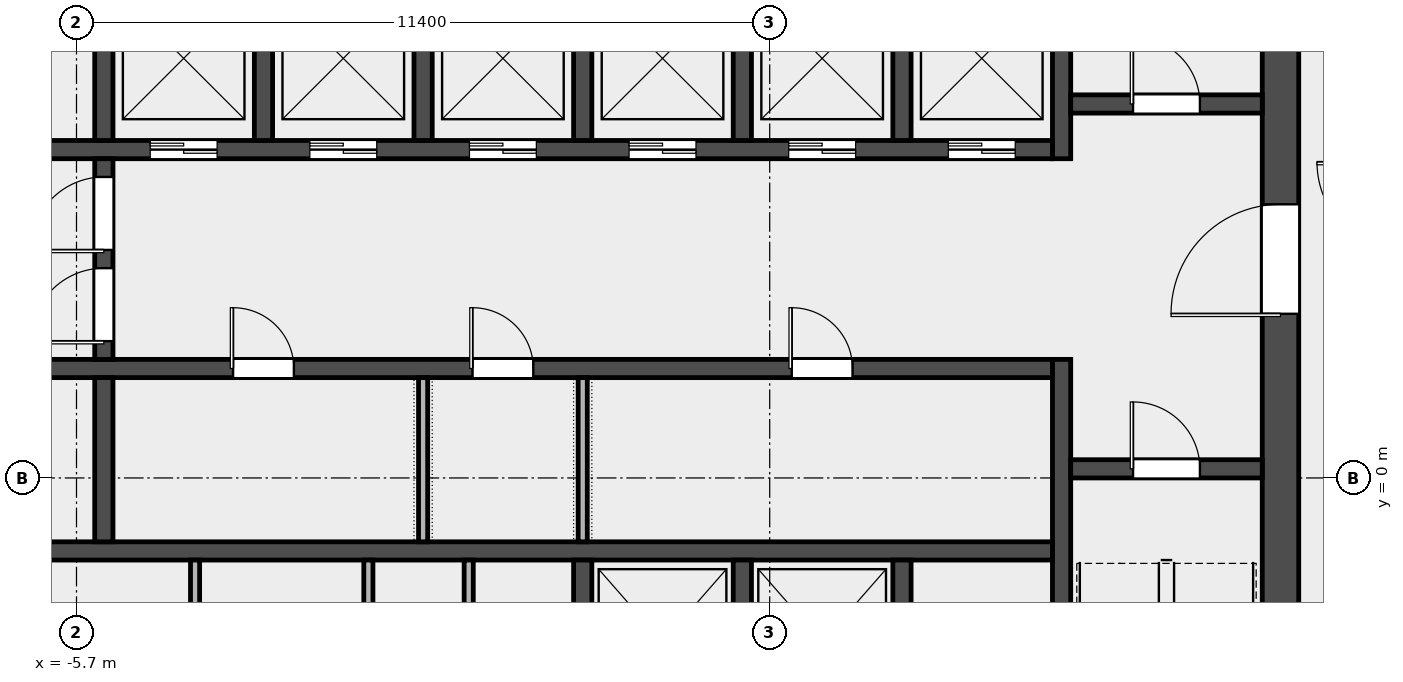
"""IFC4 building model, lengths in metres.
Left out: names, types, materials, properties, quantities, classifications, styles, units other than length and angle.
Written with IfcOpenShell. Run it as: python <this file> out.ifc"""

import sys

from ifc_helpers import new_model, si_unit, direction, frame, frame_2d, origin, place, context, subcontext, project, spatial, rectangle, extrude, element, fill, save


model = new_model("IFC4")
c1 = context("Model", 3, precision=1e-05, world=origin(), true_north=direction((0.0, 1.0)))
c2 = subcontext(c1, "Body", "Model", "MODEL_VIEW")
j1 = project(units=[si_unit("LENGTHUNIT", "METRE"), si_unit("PLANEANGLEUNIT", "RADIAN")], contexts=[c1])
p1 = place(None, origin())
s1 = spatial("IfcSite", under=j1, at=p1, CompositionType="ELEMENT")
p2 = place(p1, origin())
s2 = spatial("IfcBuilding", under=s1, at=p2, CompositionType="ELEMENT")
p3 = place(p2, frame((0.0, 0.0, 303.4)))
s3 = spatial("IfcBuildingStorey", under=s2, at=p3, CompositionType="ELEMENT", Elevation=303.4)
p4 = place(p3, frame((14.1, -6.6, 0.0), z_axis=(0.0, 0.0, 1.0), x_axis=(0.0, 1.0, 0.0)))
e1 = element("IfcWall", 1, at=p4, inside=s3, PredefinedType="SHEAR", context=c2, shape_type="SweptSolid", body=[
    extrude(rectangle(XDim=19.5, YDim=0.6, at=frame_2d((9.75, 0.0))), origin(), (0.0, 0.0, 1.0), 3.7),
])
p5 = place(p4, frame((9.3, 0.0, 0.0)))
e2 = element("IfcOpeningElement", 2, at=p5, cuts=e1, PredefinedType="OPENING", context=c2, shape_type="SweptSolid", body=[
    extrude(rectangle(XDim=1.8, YDim=2.1, at=frame_2d((0.9, 1.05))), frame((0.0, 0.312, 0.0), z_axis=(0.0, -1.0, 0.0), x_axis=(1.0, 0.0, 0.0)), (0.0, 0.0, 1.0), 0.624),
])
p6 = place(p3, frame((10.5, -6.6, 0.0), z_axis=(0.0, 0.0, 1.0), x_axis=(0.0, 1.0, 0.0)))
e3 = element("IfcWall", 3, at=p6, inside=s3, PredefinedType="SHEAR", context=c2, shape_type="SweptSolid", body=[
    extrude(rectangle(XDim=8.55, YDim=0.3, at=frame_2d((4.275, 0.0))), origin(), (0.0, 0.0, 1.0), 3.7),
])
p7 = place(p3, frame((10.5, 5.25, 0.0), z_axis=(0.0, 0.0, 1.0), x_axis=(0.0, 1.0, 0.0)))
e4 = element("IfcWall", 4, at=p7, inside=s3, PredefinedType="SHEAR", context=c2, shape_type="SweptSolid", body=[
    extrude(rectangle(XDim=7.65, YDim=0.3, at=frame_2d((3.825, 0.0))), origin(), (0.0, 0.0, 1.0), 3.7),
])
p8 = place(p3, frame((10.65, 0.15, 0.0), z_axis=(0.0, 0.0, 1.0), x_axis=(1.0, 0.0, 0.0)))
e5 = element("IfcWall", 5, at=p8, inside=s3, PredefinedType="SOLIDWALL", context=c2, shape_type="SweptSolid", body=[
    extrude(rectangle(XDim=3.15, YDim=0.3, at=frame_2d((1.575, 0.0))), origin(), (0.0, 0.0, 1.0), 3.7),
])
p9 = place(p8, frame((1.025, 0.0, 0.0)))
e6 = element("IfcOpeningElement", 6, at=p9, cuts=e5, PredefinedType="OPENING", context=c2, shape_type="SweptSolid", body=[
    extrude(rectangle(XDim=1.1, YDim=2.1, at=frame_2d((0.55, 1.05))), frame((0.0, 0.162, 0.0), z_axis=(0.0, -1.0, 0.0), x_axis=(1.0, 0.0, 0.0)), (0.0, 0.0, 1.0), 0.324),
])
p10 = place(p3, frame((10.65, 6.15, 0.0), z_axis=(0.0, 0.0, 1.0), x_axis=(1.0, 0.0, 0.0)))
e7 = element("IfcWall", 7, at=p10, inside=s3, PredefinedType="SOLIDWALL", context=c2, shape_type="SweptSolid", body=[
    extrude(rectangle(XDim=3.15, YDim=0.3, at=frame_2d((1.575, 0.0))), origin(), (0.0, 0.0, 1.0), 3.7),
])
p11 = place(p10, frame((1.025, 0.0, 0.0)))
e8 = element("IfcOpeningElement", 8, at=p11, cuts=e7, PredefinedType="OPENING", context=c2, shape_type="SweptSolid", body=[
    extrude(rectangle(XDim=1.1, YDim=2.1, at=frame_2d((0.55, 1.05))), frame((0.0, 0.162, 0.0), z_axis=(0.0, -1.0, 0.0), x_axis=(1.0, 0.0, 0.0)), (0.0, 0.0, 1.0), 0.324),
])
p12 = place(p3, frame((-10.35, -1.2, 0.0), z_axis=(0.0, 0.0, 1.0), x_axis=(1.0, 0.0, 0.0)))
e9 = element("IfcWall", 9, at=p12, inside=s3, PredefinedType="SOLIDWALL", context=c2, shape_type="SweptSolid", body=[
    extrude(rectangle(XDim=20.7, YDim=0.3, at=frame_2d((10.35, 0.0))), origin(), (0.0, 0.0, 1.0), 3.7),
])
p13 = place(p3, frame((-10.35, 1.8, 0.0), z_axis=(0.0, 0.0, 1.0), x_axis=(1.0, 0.0, 0.0)))
e10 = element("IfcWall", 10, at=p13, inside=s3, PredefinedType="SOLIDWALL", context=c2, shape_type="SweptSolid", body=[
    extrude(rectangle(XDim=20.7, YDim=0.3, at=frame_2d((10.35, 0.0))), origin(), (0.0, 0.0, 1.0), 3.7),
])
p14 = place(p13, frame((0.512, 0.0, 0.0)))
e11 = element("IfcOpeningElement", 11, at=p14, cuts=e10, PredefinedType="OPENING", context=c2, shape_type="SweptSolid", body=[
    extrude(rectangle(XDim=1.3, YDim=2.1, at=frame_2d((0.65, 1.05))), frame((0.0, 0.162, 0.0), z_axis=(0.0, -1.0, 0.0), x_axis=(1.0, 0.0, 0.0)), (0.0, 0.0, 1.0), 0.324),
])
p15 = place(p13, frame((7.225, 0.0, 0.0)))
e12 = element("IfcOpeningElement", 12, at=p15, cuts=e10, PredefinedType="OPENING", context=c2, shape_type="SweptSolid", body=[
    extrude(rectangle(XDim=1.0, YDim=2.1, at=frame_2d((0.5, 1.05))), frame((0.0, 0.162, 0.0), z_axis=(0.0, -1.0, 0.0), x_axis=(1.0, 0.0, 0.0)), (0.0, 0.0, 1.0), 0.324),
])
p16 = place(p13, frame((11.163, 0.0, 0.0)))
e13 = element("IfcOpeningElement", 13, at=p16, cuts=e10, PredefinedType="OPENING", context=c2, shape_type="SweptSolid", body=[
    extrude(rectangle(XDim=1.0, YDim=2.1, at=frame_2d((0.5, 1.05))), frame((0.0, 0.162, 0.0), z_axis=(0.0, -1.0, 0.0), x_axis=(1.0, 0.0, 0.0)), (0.0, 0.0, 1.0), 0.324),
])
p17 = place(p13, frame((16.413, 0.0, 0.0)))
e14 = element("IfcOpeningElement", 14, at=p17, cuts=e10, PredefinedType="OPENING", context=c2, shape_type="SweptSolid", body=[
    extrude(rectangle(XDim=1.0, YDim=2.1, at=frame_2d((0.5, 1.05))), frame((0.0, 0.162, 0.0), z_axis=(0.0, -1.0, 0.0), x_axis=(1.0, 0.0, 0.0)), (0.0, 0.0, 1.0), 0.324),
])
p18 = place(p3, frame((-10.35, 5.4, 0.0), z_axis=(0.0, 0.0, 1.0), x_axis=(1.0, 0.0, 0.0)))
e15 = element("IfcWall", 15, at=p18, inside=s3, PredefinedType="SOLIDWALL", context=c2, shape_type="SweptSolid", body=[
    extrude(rectangle(XDim=20.7, YDim=0.3, at=frame_2d((10.35, 0.0))), origin(), (0.0, 0.0, 1.0), 3.7),
])
p19 = place(p18, frame((0.512, 0.0, 0.0)))
e16 = element("IfcOpeningElement", 16, at=p19, cuts=e15, PredefinedType="OPENING", context=c2, shape_type="SweptSolid", body=[
    extrude(rectangle(XDim=1.3, YDim=2.1, at=frame_2d((0.65, 1.05))), frame((0.0, 0.162, 0.0), z_axis=(0.0, -1.0, 0.0), x_axis=(1.0, 0.0, 0.0)), (0.0, 0.0, 1.0), 0.324),
])
p20 = place(p18, frame((5.863, 0.0, 0.0)))
e17 = element("IfcOpeningElement", 17, at=p20, cuts=e15, PredefinedType="OPENING", context=c2, shape_type="SweptSolid", body=[
    extrude(rectangle(XDim=1.1, YDim=2.1, at=frame_2d((0.55, 1.05))), frame((0.0, 0.162, 0.0), z_axis=(0.0, -1.0, 0.0), x_axis=(1.0, 0.0, 0.0)), (0.0, 0.0, 1.0), 0.324),
])
p21 = place(p18, frame((8.488, 0.0, 0.0)))
e18 = element("IfcOpeningElement", 18, at=p21, cuts=e15, PredefinedType="OPENING", context=c2, shape_type="SweptSolid", body=[
    extrude(rectangle(XDim=1.1, YDim=2.1, at=frame_2d((0.55, 1.05))), frame((0.0, 0.162, 0.0), z_axis=(0.0, -1.0, 0.0), x_axis=(1.0, 0.0, 0.0)), (0.0, 0.0, 1.0), 0.324),
])
p22 = place(p18, frame((11.113, 0.0, 0.0)))
e19 = element("IfcOpeningElement", 19, at=p22, cuts=e15, PredefinedType="OPENING", context=c2, shape_type="SweptSolid", body=[
    extrude(rectangle(XDim=1.1, YDim=2.1, at=frame_2d((0.55, 1.05))), frame((0.0, 0.162, 0.0), z_axis=(0.0, -1.0, 0.0), x_axis=(1.0, 0.0, 0.0)), (0.0, 0.0, 1.0), 0.324),
])
p23 = place(p18, frame((13.738, 0.0, 0.0)))
e20 = element("IfcOpeningElement", 20, at=p23, cuts=e15, PredefinedType="OPENING", context=c2, shape_type="SweptSolid", body=[
    extrude(rectangle(XDim=1.1, YDim=2.1, at=frame_2d((0.55, 1.05))), frame((0.0, 0.162, 0.0), z_axis=(0.0, -1.0, 0.0), x_axis=(1.0, 0.0, 0.0)), (0.0, 0.0, 1.0), 0.324),
])
p24 = place(p18, frame((16.363, 0.0, 0.0)))
e21 = element("IfcOpeningElement", 21, at=p24, cuts=e15, PredefinedType="OPENING", context=c2, shape_type="SweptSolid", body=[
    extrude(rectangle(XDim=1.1, YDim=2.1, at=frame_2d((0.55, 1.05))), frame((0.0, 0.162, 0.0), z_axis=(0.0, -1.0, 0.0), x_axis=(1.0, 0.0, 0.0)), (0.0, 0.0, 1.0), 0.324),
])
p25 = place(p18, frame((18.988, 0.0, 0.0)))
e22 = element("IfcOpeningElement", 22, at=p25, cuts=e15, PredefinedType="OPENING", context=c2, shape_type="SweptSolid", body=[
    extrude(rectangle(XDim=1.1, YDim=2.1, at=frame_2d((0.55, 1.05))), frame((0.0, 0.162, 0.0), z_axis=(0.0, -1.0, 0.0), x_axis=(1.0, 0.0, 0.0)), (0.0, 0.0, 1.0), 0.324),
])
for number, where, z_axis, x_axis in (
    (23, (-5.25, -1.05, 0.0), (0.0, 0.0, 1.0), (0.0, 1.0, 0.0)),
    (24, (-5.25, 5.55, 0.0), (0.0, 0.0, 1.0), (0.0, 1.0, 0.0)),
    (25, (-2.625, 5.55, 0.0), (0.0, 0.0, 1.0), (0.0, 1.0, 0.0)),
    (26, (0.0, 5.55, 0.0), (0.0, 0.0, 1.0), (0.0, 1.0, 0.0)),
    (27, (2.625, 5.55, 0.0), (0.0, 0.0, 1.0), (0.0, 1.0, 0.0)),
    (28, (5.25, 5.55, 0.0), (0.0, 0.0, 1.0), (0.0, 1.0, 0.0)),
    (29, (7.875, 5.55, 0.0), (0.0, 0.0, 1.0), (0.0, 1.0, 0.0)),
):
    element("IfcWall", number, at=place(p3, frame(where, z_axis=z_axis, x_axis=x_axis)), inside=s3, PredefinedType="SOLIDWALL", context=c2, shape_type="SweptSolid", body=[
        extrude(rectangle(XDim=2.7, YDim=0.3, at=frame_2d((1.35, 0.0))), origin(), (0.0, 0.0, 1.0), 3.7),
    ])
p26 = place(p3, frame((-5.25, 1.95, 0.0), z_axis=(0.0, 0.0, 1.0), x_axis=(0.0, 1.0, 0.0)))
e30 = element("IfcWall", 30, at=p26, inside=s3, PredefinedType="SOLIDWALL", context=c2, shape_type="SweptSolid", body=[
    extrude(rectangle(XDim=3.3, YDim=0.3, at=frame_2d((1.65, 0.0))), origin(), (0.0, 0.0, 1.0), 3.7),
])
p27 = place(p26, frame((0.3, 0.0, 0.0)))
e31 = element("IfcOpeningElement", 31, at=p27, cuts=e30, PredefinedType="OPENING", context=c2, shape_type="SweptSolid", body=[
    extrude(rectangle(XDim=1.2, YDim=2.1, at=frame_2d((0.6, 1.05))), frame((0.0, 0.162, 0.0), z_axis=(0.0, -1.0, 0.0), x_axis=(1.0, 0.0, 0.0)), (0.0, 0.0, 1.0), 0.324),
])
p28 = place(p26, frame((1.8, 0.0, 0.0)))
e32 = element("IfcOpeningElement", 32, at=p28, cuts=e30, PredefinedType="OPENING", context=c2, shape_type="SweptSolid", body=[
    extrude(rectangle(XDim=1.2, YDim=2.1, at=frame_2d((0.6, 1.05))), frame((0.0, 0.162, 0.0), z_axis=(0.0, -1.0, 0.0), x_axis=(1.0, 0.0, 0.0)), (0.0, 0.0, 1.0), 0.324),
])
for number, where, z_axis, x_axis in (
    (33, (2.625, -4.05, 0.0), (0.0, 0.0, 1.0), (0.0, 1.0, 0.0)),
    (34, (5.25, -4.05, 0.0), (0.0, 0.0, 1.0), (0.0, 1.0, 0.0)),
    (35, (7.875, -4.05, 0.0), (0.0, 0.0, 1.0), (0.0, 1.0, 0.0)),
):
    element("IfcWall", number, at=place(p3, frame(where, z_axis=z_axis, x_axis=x_axis)), inside=s3, PredefinedType="SOLIDWALL", context=c2, shape_type="SweptSolid", body=[
        extrude(rectangle(XDim=2.7, YDim=0.3, at=frame_2d((1.35, 0.0))), origin(), (0.0, 0.0, 1.0), 3.7),
    ])
for number, where, z_axis, x_axis in (
    (36, (-3.75, -4.425, 0.0), (0.0, 0.0, 1.0), (0.0, 1.0, 0.0)),
    (37, (-0.9, -4.425, 0.0), (0.0, 0.0, 1.0), (0.0, 1.0, 0.0)),
):
    element("IfcWall", number, at=place(p3, frame(where, z_axis=z_axis, x_axis=x_axis)), inside=s3, PredefinedType="PARTITIONING", context=c2, shape_type="SweptSolid", body=[
        extrude(rectangle(XDim=3.075, YDim=0.15, at=frame_2d((1.538, 0.0))), origin(), (0.0, 0.0, 1.0), 3.7),
    ])
p29 = place(p3, frame((0.75, -6.6, 0.0), z_axis=(0.0, 0.0, 1.0), x_axis=(0.0, 1.0, 0.0)))
e38 = element("IfcWall", 38, at=p29, inside=s3, PredefinedType="PARTITIONING", context=c2, shape_type="SweptSolid", body=[
    extrude(rectangle(XDim=5.25, YDim=0.15, at=frame_2d((2.625, 0.0))), origin(), (0.0, 0.0, 1.0), 3.7),
])
for number, where, z_axis, x_axis in (
    (39, (0.0, -1.05, 0.0), (0.0, 0.0, 1.0), (0.0, 1.0, 0.0)),
    (40, (2.625, -1.05, 0.0), (0.0, 0.0, 1.0), (0.0, 1.0, 0.0)),
):
    element("IfcWall", number, at=place(p3, frame(where, z_axis=z_axis, x_axis=x_axis)), inside=s3, PredefinedType="PARTITIONING", context=c2, shape_type="SweptSolid", body=[
        extrude(rectangle(XDim=2.7, YDim=0.15, at=frame_2d((1.35, 0.0))), origin(), (0.0, 0.0, 1.0), 3.7),
    ])
p30 = place(p9, origin())
e41 = element("IfcDoor", 41, at=p30, inside=s3, OperationType="SINGLE_SWING_RIGHT", PredefinedType="DOOR", context=c2, shape_type="SweptSolid", body=[
    extrude(rectangle(XDim=1.1, YDim=2.1, at=frame_2d((0.55, 1.05))), frame((0.0, 0.025, 0.0), z_axis=(0.0, -1.0, 0.0), x_axis=(1.0, 0.0, 0.0)), (0.0, 0.0, 1.0), 0.05),
])
fill(e6, e41)
p31 = place(p11, origin())
e42 = element("IfcDoor", 42, at=p31, inside=s3, OperationType="SINGLE_SWING_RIGHT", PredefinedType="DOOR", context=c2, shape_type="SweptSolid", body=[
    extrude(rectangle(XDim=1.1, YDim=2.1, at=frame_2d((0.55, 1.05))), frame((0.0, 0.025, 0.0), z_axis=(0.0, -1.0, 0.0), x_axis=(1.0, 0.0, 0.0)), (0.0, 0.0, 1.0), 0.05),
])
fill(e8, e42)
p32 = place(p5, origin())
e43 = element("IfcDoor", 43, at=p32, inside=s3, OperationType="DOUBLE_DOOR_SINGLE_SWING", PredefinedType="DOOR", context=c2, shape_type="SweptSolid", body=[
    extrude(rectangle(XDim=1.8, YDim=2.1, at=frame_2d((0.9, 1.05))), frame((0.0, 0.025, 0.0), z_axis=(0.0, -1.0, 0.0), x_axis=(1.0, 0.0, 0.0)), (0.0, 0.0, 1.0), 0.05),
])
fill(e2, e43)
p33 = place(p27, origin())
e44 = element("IfcDoor", 44, at=p33, inside=s3, OperationType="SINGLE_SWING_LEFT", PredefinedType="DOOR", context=c2, shape_type="SweptSolid", body=[
    extrude(rectangle(XDim=1.2, YDim=2.1, at=frame_2d((0.6, 1.05))), frame((0.0, 0.025, 0.0), z_axis=(0.0, -1.0, 0.0), x_axis=(1.0, 0.0, 0.0)), (0.0, 0.0, 1.0), 0.05),
])
fill(e31, e44)
p34 = place(p28, origin())
e45 = element("IfcDoor", 45, at=p34, inside=s3, OperationType="SINGLE_SWING_RIGHT", PredefinedType="DOOR", context=c2, shape_type="SweptSolid", body=[
    extrude(rectangle(XDim=1.2, YDim=2.1, at=frame_2d((0.6, 1.05))), frame((0.0, 0.025, 0.0), z_axis=(0.0, -1.0, 0.0), x_axis=(1.0, 0.0, 0.0)), (0.0, 0.0, 1.0), 0.05),
])
fill(e32, e45)
p35 = place(p20, origin())
e46 = element("IfcDoor", 46, at=p35, inside=s3, OperationType="DOUBLE_DOOR_SLIDING", PredefinedType="DOOR", context=c2, shape_type="SweptSolid", body=[
    extrude(rectangle(XDim=1.1, YDim=2.1, at=frame_2d((0.55, 1.05))), frame((0.0, 0.025, 0.0), z_axis=(0.0, -1.0, 0.0), x_axis=(1.0, 0.0, 0.0)), (0.0, 0.0, 1.0), 0.05),
])
fill(e17, e46)
p36 = place(p21, origin())
e47 = element("IfcDoor", 47, at=p36, inside=s3, OperationType="DOUBLE_DOOR_SLIDING", PredefinedType="DOOR", context=c2, shape_type="SweptSolid", body=[
    extrude(rectangle(XDim=1.1, YDim=2.1, at=frame_2d((0.55, 1.05))), frame((0.0, 0.025, 0.0), z_axis=(0.0, -1.0, 0.0), x_axis=(1.0, 0.0, 0.0)), (0.0, 0.0, 1.0), 0.05),
])
fill(e18, e47)
p37 = place(p22, origin())
e48 = element("IfcDoor", 48, at=p37, inside=s3, OperationType="DOUBLE_DOOR_SLIDING", PredefinedType="DOOR", context=c2, shape_type="SweptSolid", body=[
    extrude(rectangle(XDim=1.1, YDim=2.1, at=frame_2d((0.55, 1.05))), frame((0.0, 0.025, 0.0), z_axis=(0.0, -1.0, 0.0), x_axis=(1.0, 0.0, 0.0)), (0.0, 0.0, 1.0), 0.05),
])
fill(e19, e48)
p38 = place(p23, origin())
e49 = element("IfcDoor", 49, at=p38, inside=s3, OperationType="DOUBLE_DOOR_SLIDING", PredefinedType="DOOR", context=c2, shape_type="SweptSolid", body=[
    extrude(rectangle(XDim=1.1, YDim=2.1, at=frame_2d((0.55, 1.05))), frame((0.0, 0.025, 0.0), z_axis=(0.0, -1.0, 0.0), x_axis=(1.0, 0.0, 0.0)), (0.0, 0.0, 1.0), 0.05),
])
fill(e20, e49)
p39 = place(p24, origin())
e50 = element("IfcDoor", 50, at=p39, inside=s3, OperationType="DOUBLE_DOOR_SLIDING", PredefinedType="DOOR", context=c2, shape_type="SweptSolid", body=[
    extrude(rectangle(XDim=1.1, YDim=2.1, at=frame_2d((0.55, 1.05))), frame((0.0, 0.025, 0.0), z_axis=(0.0, -1.0, 0.0), x_axis=(1.0, 0.0, 0.0)), (0.0, 0.0, 1.0), 0.05),
])
fill(e21, e50)
p40 = place(p25, origin())
e51 = element("IfcDoor", 51, at=p40, inside=s3, OperationType="DOUBLE_DOOR_SLIDING", PredefinedType="DOOR", context=c2, shape_type="SweptSolid", body=[
    extrude(rectangle(XDim=1.1, YDim=2.1, at=frame_2d((0.55, 1.05))), frame((0.0, 0.025, 0.0), z_axis=(0.0, -1.0, 0.0), x_axis=(1.0, 0.0, 0.0)), (0.0, 0.0, 1.0), 0.05),
])
fill(e22, e51)
p41 = place(p15, origin())
e52 = element("IfcDoor", 52, at=p41, inside=s3, OperationType="SINGLE_SWING_LEFT", PredefinedType="DOOR", context=c2, shape_type="SweptSolid", body=[
    extrude(rectangle(XDim=1.0, YDim=2.1, at=frame_2d((0.5, 1.05))), frame((0.0, 0.025, 0.0), z_axis=(0.0, -1.0, 0.0), x_axis=(1.0, 0.0, 0.0)), (0.0, 0.0, 1.0), 0.05),
])
fill(e12, e52)
p42 = place(p16, origin())
e53 = element("IfcDoor", 53, at=p42, inside=s3, OperationType="SINGLE_SWING_LEFT", PredefinedType="DOOR", context=c2, shape_type="SweptSolid", body=[
    extrude(rectangle(XDim=1.0, YDim=2.1, at=frame_2d((0.5, 1.05))), frame((0.0, 0.025, 0.0), z_axis=(0.0, -1.0, 0.0), x_axis=(1.0, 0.0, 0.0)), (0.0, 0.0, 1.0), 0.05),
])
fill(e13, e53)
p43 = place(p17, origin())
e54 = element("IfcDoor", 54, at=p43, inside=s3, OperationType="SINGLE_SWING_LEFT", PredefinedType="DOOR", context=c2, shape_type="SweptSolid", body=[
    extrude(rectangle(XDim=1.0, YDim=2.1, at=frame_2d((0.5, 1.05))), frame((0.0, 0.025, 0.0), z_axis=(0.0, -1.0, 0.0), x_axis=(1.0, 0.0, 0.0)), (0.0, 0.0, 1.0), 0.05),
])
fill(e14, e54)
save(model, sys.argv[1])
